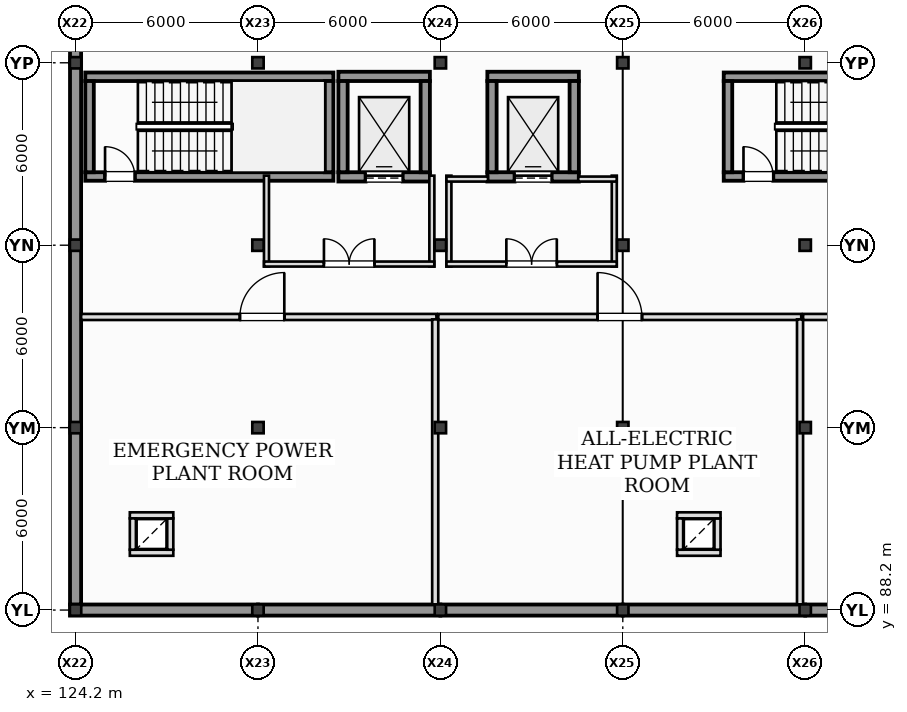
"""IFC4 building model, lengths in metres.
Left out: names, types, materials, properties, quantities, classifications, styles, units other than length and angle.
Written with IfcOpenShell. Run it as: python <this file> out.ifc"""

import sys

from ifc_helpers import new_model, si_unit, direction, frame, frame_2d, origin, origin_2d, place, context, subcontext, project, spatial, rectangle, i_section, extrude, element, fill, save


model = new_model("IFC4")
c1 = context("Model", 3, precision=1e-05, world=origin(), true_north=direction((0.0, 1.0)))
c2 = subcontext(c1, "Body", "Model", "MODEL_VIEW")
j1 = project(units=[si_unit("LENGTHUNIT", "METRE"), si_unit("PLANEANGLEUNIT", "RADIAN")], contexts=[c1])
p1 = place(None, origin())
s1 = spatial("IfcSite", under=j1, at=p1, CompositionType="ELEMENT")
p2 = place(p1, origin())
s2 = spatial("IfcBuilding", under=s1, at=p2, CompositionType="ELEMENT")
p3 = place(p2, frame((0.0, 0.0, -4.2)))
s3 = spatial("IfcBuildingStorey", under=s2, at=p3, CompositionType="ELEMENT", Elevation=-4.2)
for number, where, z_axis, x_axis in (
    (1, (124.2, 88.2, -0.45), (0.0, 0.0, 1.0), (1.0, 0.0, 0.0)),
    (2, (124.2, 94.2, -0.45), (0.0, 0.0, 1.0), (1.0, 0.0, 0.0)),
    (3, (124.2, 100.2, -0.45), (0.0, 0.0, 1.0), (1.0, 0.0, 0.0)),
    (4, (124.2, 106.2, -0.45), (0.0, 0.0, 1.0), (1.0, 0.0, 0.0)),
    (5, (130.2, 88.2, -0.45), (0.0, 0.0, 1.0), (1.0, 0.0, 0.0)),
    (6, (130.2, 94.2, -0.45), (0.0, 0.0, 1.0), (1.0, 0.0, 0.0)),
    (7, (130.2, 100.2, -0.45), (0.0, 0.0, 1.0), (1.0, 0.0, 0.0)),
    (8, (130.2, 106.2, -0.45), (0.0, 0.0, 1.0), (1.0, 0.0, 0.0)),
    (9, (136.2, 88.2, -0.45), (0.0, 0.0, 1.0), (1.0, 0.0, 0.0)),
    (10, (136.2, 94.2, -0.45), (0.0, 0.0, 1.0), (1.0, 0.0, 0.0)),
    (11, (136.2, 100.2, -0.45), (0.0, 0.0, 1.0), (1.0, 0.0, 0.0)),
    (12, (136.2, 106.2, -0.45), (0.0, 0.0, 1.0), (1.0, 0.0, 0.0)),
    (13, (142.2, 88.2, -0.45), (0.0, 0.0, 1.0), (1.0, 0.0, 0.0)),
    (14, (142.2, 94.2, -0.45), (0.0, 0.0, 1.0), (1.0, 0.0, 0.0)),
    (15, (142.2, 100.2, -0.45), (0.0, 0.0, 1.0), (1.0, 0.0, 0.0)),
    (16, (142.2, 106.2, -0.45), (0.0, 0.0, 1.0), (1.0, 0.0, 0.0)),
    (17, (148.2, 88.2, -0.45), (0.0, 0.0, 1.0), (1.0, 0.0, 0.0)),
    (18, (148.2, 94.2, -0.45), (0.0, 0.0, 1.0), (1.0, 0.0, 0.0)),
    (19, (148.2, 100.2, -0.45), (0.0, 0.0, 1.0), (1.0, 0.0, 0.0)),
    (20, (148.2, 106.2, -0.45), (0.0, 0.0, 1.0), (1.0, 0.0, 0.0)),
):
    element("IfcColumn", number, at=place(p3, frame(where, z_axis=z_axis, x_axis=x_axis)), inside=s3, PredefinedType="COLUMN", context=c2, shape_type="SweptSolid", body=[
        extrude(i_section(OverallWidth=0.374, OverallDepth=0.372, WebThickness=0.016, FlangeThickness=0.026, at=origin_2d()), origin(), (0.0, 0.0, 1.0), 4.65),
    ])
p4 = place(p3, frame((124.018, 88.2, 0.0), z_axis=(0.0, 0.0, 1.0), x_axis=(1.0, 0.0, 0.0)))
e21 = element("IfcWall", 21, at=p4, inside=s3, PredefinedType="SHEAR", context=c2, shape_type="SweptSolid", body=[
    extrude(rectangle(XDim=6.181, YDim=0.365, at=frame_2d((3.091, 0.0))), origin(), (0.0, 0.0, 1.0), 3.85),
])
for number, where, z_axis, x_axis in (
    (22, (130.201, 88.2, 0.0), (0.0, 0.0, 1.0), (1.0, 0.0, 0.0)),
    (23, (136.201, 88.2, 0.0), (0.0, 0.0, 1.0), (1.0, 0.0, 0.0)),
    (24, (142.201, 88.2, 0.0), (0.0, 0.0, 1.0), (1.0, 0.0, 0.0)),
    (25, (148.201, 88.2, 0.0), (0.0, 0.0, 1.0), (1.0, 0.0, 0.0)),
):
    element("IfcWall", number, at=place(p3, frame(where, z_axis=z_axis, x_axis=x_axis)), inside=s3, PredefinedType="SHEAR", context=c2, shape_type="SweptSolid", body=[
        extrude(rectangle(XDim=5.998, YDim=0.365, at=frame_2d((2.999, 0.0))), origin(), (0.0, 0.0, 1.0), 3.85),
    ])
p5 = place(p3, frame((124.2, 94.199, 0.0), z_axis=(0.0, 0.0, 1.0), x_axis=(0.0, -1.0, 0.0)))
e26 = element("IfcWall", 26, at=p5, inside=s3, PredefinedType="SHEAR", context=c2, shape_type="SweptSolid", body=[
    extrude(rectangle(XDim=5.814, YDim=0.365, at=frame_2d((2.907, 0.0))), origin(), (0.0, 0.0, 1.0), 3.85),
])
for number, where, z_axis, x_axis in (
    (27, (124.2, 100.199, 0.0), (0.0, 0.0, 1.0), (0.0, -1.0, 0.0)),
    (28, (124.2, 106.199, 0.0), (0.0, 0.0, 1.0), (0.0, -1.0, 0.0)),
):
    element("IfcWall", number, at=place(p3, frame(where, z_axis=z_axis, x_axis=x_axis)), inside=s3, PredefinedType="SHEAR", context=c2, shape_type="SweptSolid", body=[
        extrude(rectangle(XDim=5.998, YDim=0.365, at=frame_2d((2.999, 0.0))), origin(), (0.0, 0.0, 1.0), 3.85),
    ])
p6 = place(p3, frame((124.2, 112.015, 0.0), z_axis=(0.0, 0.0, 1.0), x_axis=(0.0, -1.0, 0.0)))
e29 = element("IfcWall", 29, at=p6, inside=s3, PredefinedType="SHEAR", context=c2, shape_type="SweptSolid", body=[
    extrude(rectangle(XDim=5.814, YDim=0.365, at=frame_2d((2.907, 0.0))), origin(), (0.0, 0.0, 1.0), 3.85),
])
p7 = place(p3, frame((124.52, 102.46, 0.0), z_axis=(0.0, 0.0, 1.0), x_axis=(1.0, 0.0, 0.0)))
e30 = element("IfcWall", 30, at=p7, inside=s3, PredefinedType="SHEAR", context=c2, shape_type="SweptSolid", body=[
    extrude(rectangle(XDim=8.16, YDim=0.28, at=frame_2d((4.08, 0.0))), origin(), (0.0, 0.0, 1.0), 4.2),
])
p8 = place(p7, frame((0.65, 0.0, 0.0)))
e31 = element("IfcOpeningElement", 31, at=p8, cuts=e30, PredefinedType="OPENING", context=c2, shape_type="SweptSolid", body=[
    extrude(rectangle(XDim=0.98, YDim=2.15, at=frame_2d((0.49, 1.075))), frame((0.0, 0.15, 0.0), z_axis=(0.0, -1.0, 0.0), x_axis=(1.0, 0.0, 0.0)), (0.0, 0.0, 1.0), 0.3),
])
p9 = place(p3, frame((132.68, 105.74, 0.0), z_axis=(0.0, 0.0, 1.0), x_axis=(-1.0, 0.0, 0.0)))
e32 = element("IfcWall", 32, at=p9, inside=s3, PredefinedType="SHEAR", context=c2, shape_type="SweptSolid", body=[
    extrude(rectangle(XDim=8.16, YDim=0.28, at=frame_2d((4.08, 0.0))), origin(), (0.0, 0.0, 1.0), 4.2),
])
for number, where, z_axis, x_axis in (
    (33, (124.66, 105.6, 0.0), (0.0, 0.0, 1.0), (0.0, -1.0, 0.0)),
    (34, (132.54, 102.6, 0.0), (0.0, 0.0, 1.0), (0.0, 1.0, 0.0)),
):
    element("IfcWall", number, at=place(p3, frame(where, z_axis=z_axis, x_axis=x_axis)), inside=s3, PredefinedType="SHEAR", context=c2, shape_type="SweptSolid", body=[
        extrude(rectangle(XDim=3.0, YDim=0.28, at=frame_2d((1.5, 0.0))), origin(), (0.0, 0.0, 1.0), 4.2),
    ])
p10 = place(p3, frame((145.52, 102.46, 0.0), z_axis=(0.0, 0.0, 1.0), x_axis=(1.0, 0.0, 0.0)))
e35 = element("IfcWall", 35, at=p10, inside=s3, PredefinedType="SHEAR", context=c2, shape_type="SweptSolid", body=[
    extrude(rectangle(XDim=8.16, YDim=0.28, at=frame_2d((4.08, 0.0))), origin(), (0.0, 0.0, 1.0), 4.2),
])
p11 = place(p10, frame((0.65, 0.0, 0.0)))
e36 = element("IfcOpeningElement", 36, at=p11, cuts=e35, PredefinedType="OPENING", context=c2, shape_type="SweptSolid", body=[
    extrude(rectangle(XDim=0.98, YDim=2.15, at=frame_2d((0.49, 1.075))), frame((0.0, 0.15, 0.0), z_axis=(0.0, -1.0, 0.0), x_axis=(1.0, 0.0, 0.0)), (0.0, 0.0, 1.0), 0.3),
])
p12 = place(p3, frame((153.68, 105.74, 0.0), z_axis=(0.0, 0.0, 1.0), x_axis=(-1.0, 0.0, 0.0)))
e37 = element("IfcWall", 37, at=p12, inside=s3, PredefinedType="SHEAR", context=c2, shape_type="SweptSolid", body=[
    extrude(rectangle(XDim=8.16, YDim=0.28, at=frame_2d((4.08, 0.0))), origin(), (0.0, 0.0, 1.0), 4.2),
])
p13 = place(p3, frame((145.66, 105.6, 0.0), z_axis=(0.0, 0.0, 1.0), x_axis=(0.0, -1.0, 0.0)))
e38 = element("IfcWall", 38, at=p13, inside=s3, PredefinedType="SHEAR", context=c2, shape_type="SweptSolid", body=[
    extrude(rectangle(XDim=3.0, YDim=0.28, at=frame_2d((1.5, 0.0))), origin(), (0.0, 0.0, 1.0), 4.2),
])
p14 = place(p3, frame((132.845, 102.448, 0.0), z_axis=(0.0, 0.0, 1.0), x_axis=(1.0, 0.0, 0.0)))
e39 = element("IfcWall", 39, at=p14, inside=s3, PredefinedType="SHEAR", context=c2, shape_type="SweptSolid", body=[
    extrude(rectangle(XDim=3.01, YDim=0.305, at=frame_2d((1.505, 0.0))), origin(), (0.0, 0.0, 1.0), 4.2),
])
p15 = place(p14, frame((0.895, 0.0, 0.0)))
e40 = element("IfcOpeningElement", 40, at=p15, cuts=e39, PredefinedType="OPENING", context=c2, shape_type="SweptSolid", body=[
    extrude(rectangle(XDim=1.22, YDim=2.22, at=frame_2d((0.61, 1.11))), frame((0.0, 0.162, 0.0), z_axis=(0.0, -1.0, 0.0), x_axis=(1.0, 0.0, 0.0)), (0.0, 0.0, 1.0), 0.325),
])
p16 = place(p3, frame((135.855, 105.752, 0.0), z_axis=(0.0, 0.0, 1.0), x_axis=(-1.0, 0.0, 0.0)))
e41 = element("IfcWall", 41, at=p16, inside=s3, PredefinedType="SHEAR", context=c2, shape_type="SweptSolid", body=[
    extrude(rectangle(XDim=3.01, YDim=0.305, at=frame_2d((1.505, 0.0))), origin(), (0.0, 0.0, 1.0), 4.2),
])
for number, where, z_axis, x_axis in (
    (42, (132.998, 105.6, 0.0), (0.0, 0.0, 1.0), (0.0, -1.0, 0.0)),
    (43, (135.702, 102.6, 0.0), (0.0, 0.0, 1.0), (0.0, 1.0, 0.0)),
):
    element("IfcWall", number, at=place(p3, frame(where, z_axis=z_axis, x_axis=x_axis)), inside=s3, PredefinedType="SHEAR", context=c2, shape_type="SweptSolid", body=[
        extrude(rectangle(XDim=3.0, YDim=0.305, at=frame_2d((1.5, 0.0))), origin(), (0.0, 0.0, 1.0), 4.2),
    ])
for number, where, z_axis, x_axis in (
    (44, (130.48, 99.5, 0.0), (0.0, 0.0, 1.0), (0.0, 1.0, 0.0)),
    (45, (135.92, 102.488, 0.0), (0.0, 0.0, 1.0), (0.0, -1.0, 0.0)),
):
    element("IfcWall", number, at=place(p3, frame(where, z_axis=z_axis, x_axis=x_axis)), inside=s3, PredefinedType="PARTITIONING", context=c2, shape_type="SweptSolid", body=[
        extrude(rectangle(XDim=2.988, YDim=0.165, at=frame_2d((1.494, 0.0))), origin(), (0.0, 0.0, 1.0), 3.79),
    ])
p17 = place(p3, frame((130.4, 99.58, 0.0), z_axis=(0.0, 0.0, 1.0), x_axis=(1.0, 0.0, 0.0)))
e46 = element("IfcWall", 46, at=p17, inside=s3, PredefinedType="PARTITIONING", context=c2, shape_type="SweptSolid", body=[
    extrude(rectangle(XDim=5.6, YDim=0.165, at=frame_2d((2.8, 0.0))), origin(), (0.0, 0.0, 1.0), 3.79),
])
p18 = place(p17, frame((1.97, 0.0, 0.0)))
e47 = element("IfcOpeningElement", 47, at=p18, cuts=e46, PredefinedType="OPENING", context=c2, shape_type="SweptSolid", body=[
    extrude(rectangle(XDim=1.66, YDim=2.2, at=frame_2d((0.83, 1.1))), frame((0.0, 0.093, 0.0), z_axis=(0.0, -1.0, 0.0), x_axis=(1.0, 0.0, 0.0)), (0.0, 0.0, 1.0), 0.185),
])
p19 = place(p3, frame((137.745, 102.448, 0.0), z_axis=(0.0, 0.0, 1.0), x_axis=(1.0, 0.0, 0.0)))
e48 = element("IfcWall", 48, at=p19, inside=s3, PredefinedType="SHEAR", context=c2, shape_type="SweptSolid", body=[
    extrude(rectangle(XDim=3.01, YDim=0.305, at=frame_2d((1.505, 0.0))), origin(), (0.0, 0.0, 1.0), 4.2),
])
p20 = place(p19, frame((0.895, 0.0, 0.0)))
e49 = element("IfcOpeningElement", 49, at=p20, cuts=e48, PredefinedType="OPENING", context=c2, shape_type="SweptSolid", body=[
    extrude(rectangle(XDim=1.22, YDim=2.22, at=frame_2d((0.61, 1.11))), frame((0.0, 0.162, 0.0), z_axis=(0.0, -1.0, 0.0), x_axis=(1.0, 0.0, 0.0)), (0.0, 0.0, 1.0), 0.325),
])
p21 = place(p3, frame((140.755, 105.752, 0.0), z_axis=(0.0, 0.0, 1.0), x_axis=(-1.0, 0.0, 0.0)))
e50 = element("IfcWall", 50, at=p21, inside=s3, PredefinedType="SHEAR", context=c2, shape_type="SweptSolid", body=[
    extrude(rectangle(XDim=3.01, YDim=0.305, at=frame_2d((1.505, 0.0))), origin(), (0.0, 0.0, 1.0), 4.2),
])
for number, where, z_axis, x_axis in (
    (51, (137.897, 105.6, 0.0), (0.0, 0.0, 1.0), (0.0, -1.0, 0.0)),
    (52, (140.603, 102.6, 0.0), (0.0, 0.0, 1.0), (0.0, 1.0, 0.0)),
):
    element("IfcWall", number, at=place(p3, frame(where, z_axis=z_axis, x_axis=x_axis)), inside=s3, PredefinedType="SHEAR", context=c2, shape_type="SweptSolid", body=[
        extrude(rectangle(XDim=3.0, YDim=0.305, at=frame_2d((1.5, 0.0))), origin(), (0.0, 0.0, 1.0), 4.2),
    ])
for number, where, z_axis, x_axis in (
    (53, (136.48, 99.5, 0.0), (0.0, 0.0, 1.0), (0.0, 1.0, 0.0)),
    (54, (141.92, 102.488, 0.0), (0.0, 0.0, 1.0), (0.0, -1.0, 0.0)),
):
    element("IfcWall", number, at=place(p3, frame(where, z_axis=z_axis, x_axis=x_axis)), inside=s3, PredefinedType="PARTITIONING", context=c2, shape_type="SweptSolid", body=[
        extrude(rectangle(XDim=2.988, YDim=0.165, at=frame_2d((1.494, 0.0))), origin(), (0.0, 0.0, 1.0), 3.79),
    ])
p22 = place(p3, frame((136.4, 102.375, 0.0), z_axis=(0.0, 0.0, 1.0), x_axis=(1.0, 0.0, 0.0)))
e55 = element("IfcWall", 55, at=p22, inside=s3, PredefinedType="PARTITIONING", context=c2, shape_type="SweptSolid", body=[
    extrude(rectangle(XDim=1.365, YDim=0.165, at=frame_2d((0.683, 0.0))), origin(), (0.0, 0.0, 1.0), 3.79),
])
p23 = place(p3, frame((140.735, 102.375, 0.0), z_axis=(0.0, 0.0, 1.0), x_axis=(1.0, 0.0, 0.0)))
e56 = element("IfcWall", 56, at=p23, inside=s3, PredefinedType="PARTITIONING", context=c2, shape_type="SweptSolid", body=[
    extrude(rectangle(XDim=1.265, YDim=0.165, at=frame_2d((0.632, 0.0))), origin(), (0.0, 0.0, 1.0), 3.79),
])
p24 = place(p3, frame((136.4, 99.58, 0.0), z_axis=(0.0, 0.0, 1.0), x_axis=(1.0, 0.0, 0.0)))
e57 = element("IfcWall", 57, at=p24, inside=s3, PredefinedType="PARTITIONING", context=c2, shape_type="SweptSolid", body=[
    extrude(rectangle(XDim=5.6, YDim=0.165, at=frame_2d((2.8, 0.0))), origin(), (0.0, 0.0, 1.0), 3.79),
])
p25 = place(p24, frame((1.97, 0.0, 0.0)))
e58 = element("IfcOpeningElement", 58, at=p25, cuts=e57, PredefinedType="OPENING", context=c2, shape_type="SweptSolid", body=[
    extrude(rectangle(XDim=1.66, YDim=2.2, at=frame_2d((0.83, 1.1))), frame((0.0, 0.093, 0.0), z_axis=(0.0, -1.0, 0.0), x_axis=(1.0, 0.0, 0.0)), (0.0, 0.0, 1.0), 0.185),
])
p26 = place(p3, frame((125.985, 90.085, 0.0), z_axis=(0.0, 0.0, 1.0), x_axis=(1.0, 0.0, 0.0)))
e59 = element("IfcWall", 59, at=p26, inside=s3, PredefinedType="PARTITIONING", context=c2, shape_type="SweptSolid", body=[
    extrude(rectangle(XDim=1.43, YDim=0.2, at=frame_2d((0.715, 0.0))), origin(), (0.0, 0.0, 1.0), 3.79),
])
p27 = place(p3, frame((127.315, 90.185, 0.0), z_axis=(0.0, 0.0, 1.0), x_axis=(0.0, 1.0, 0.0)))
e60 = element("IfcWall", 60, at=p27, inside=s3, PredefinedType="PARTITIONING", context=c2, shape_type="SweptSolid", body=[
    extrude(rectangle(XDim=1.03, YDim=0.2, at=frame_2d((0.515, 0.0))), origin(), (0.0, 0.0, 1.0), 3.79),
])
p28 = place(p3, frame((127.415, 91.315, 0.0), z_axis=(0.0, 0.0, 1.0), x_axis=(-1.0, 0.0, 0.0)))
e61 = element("IfcWall", 61, at=p28, inside=s3, PredefinedType="PARTITIONING", context=c2, shape_type="SweptSolid", body=[
    extrude(rectangle(XDim=1.43, YDim=0.2, at=frame_2d((0.715, 0.0))), origin(), (0.0, 0.0, 1.0), 3.79),
])
p29 = place(p3, frame((126.085, 91.215, 0.0), z_axis=(0.0, 0.0, 1.0), x_axis=(0.0, -1.0, 0.0)))
e62 = element("IfcWall", 62, at=p29, inside=s3, PredefinedType="PARTITIONING", context=c2, shape_type="SweptSolid", body=[
    extrude(rectangle(XDim=1.03, YDim=0.2, at=frame_2d((0.515, 0.0))), origin(), (0.0, 0.0, 1.0), 3.79),
])
p30 = place(p3, frame((143.985, 90.085, 0.0), z_axis=(0.0, 0.0, 1.0), x_axis=(1.0, 0.0, 0.0)))
e63 = element("IfcWall", 63, at=p30, inside=s3, PredefinedType="PARTITIONING", context=c2, shape_type="SweptSolid", body=[
    extrude(rectangle(XDim=1.43, YDim=0.2, at=frame_2d((0.715, 0.0))), origin(), (0.0, 0.0, 1.0), 3.79),
])
p31 = place(p3, frame((145.315, 90.185, 0.0), z_axis=(0.0, 0.0, 1.0), x_axis=(0.0, 1.0, 0.0)))
e64 = element("IfcWall", 64, at=p31, inside=s3, PredefinedType="PARTITIONING", context=c2, shape_type="SweptSolid", body=[
    extrude(rectangle(XDim=1.03, YDim=0.2, at=frame_2d((0.515, 0.0))), origin(), (0.0, 0.0, 1.0), 3.79),
])
p32 = place(p3, frame((145.415, 91.315, 0.0), z_axis=(0.0, 0.0, 1.0), x_axis=(-1.0, 0.0, 0.0)))
e65 = element("IfcWall", 65, at=p32, inside=s3, PredefinedType="PARTITIONING", context=c2, shape_type="SweptSolid", body=[
    extrude(rectangle(XDim=1.43, YDim=0.2, at=frame_2d((0.715, 0.0))), origin(), (0.0, 0.0, 1.0), 3.79),
])
p33 = place(p3, frame((144.085, 91.215, 0.0), z_axis=(0.0, 0.0, 1.0), x_axis=(0.0, -1.0, 0.0)))
e66 = element("IfcWall", 66, at=p33, inside=s3, PredefinedType="PARTITIONING", context=c2, shape_type="SweptSolid", body=[
    extrude(rectangle(XDim=1.03, YDim=0.2, at=frame_2d((0.515, 0.0))), origin(), (0.0, 0.0, 1.0), 3.79),
])
p34 = place(p3, frame((124.383, 97.84, 0.0), z_axis=(0.0, 0.0, 1.0), x_axis=(1.0, 0.0, 0.0)))
e67 = element("IfcWall", 67, at=p34, inside=s3, PredefinedType="PARTITIONING", context=c2, shape_type="SweptSolid", body=[
    extrude(rectangle(XDim=11.688, YDim=0.2, at=frame_2d((5.844, 0.0))), origin(), (0.0, 0.0, 1.0), 3.79),
])
p35 = place(p34, frame((5.224, 0.0, 0.0)))
e68 = element("IfcOpeningElement", 68, at=p35, cuts=e67, PredefinedType="OPENING", context=c2, shape_type="SweptSolid", body=[
    extrude(rectangle(XDim=1.46, YDim=2.3, at=frame_2d((0.73, 1.15))), frame((0.0, 0.11, 0.0), z_axis=(0.0, -1.0, 0.0), x_axis=(1.0, 0.0, 0.0)), (0.0, 0.0, 1.0), 0.22),
])
p36 = place(p3, frame((136.03, 97.76, 0.0), z_axis=(0.0, 0.0, 1.0), x_axis=(0.0, -1.0, 0.0)))
e69 = element("IfcWall", 69, at=p36, inside=s3, PredefinedType="PARTITIONING", context=c2, shape_type="SweptSolid", body=[
    extrude(rectangle(XDim=9.377, YDim=0.2, at=frame_2d((4.689, 0.0))), origin(), (0.0, 0.0, 1.0), 3.79),
])
p37 = place(p3, frame((136.13, 97.84, 0.0), z_axis=(0.0, 0.0, 1.0), x_axis=(1.0, 0.0, 0.0)))
e70 = element("IfcWall", 70, at=p37, inside=s3, PredefinedType="PARTITIONING", context=c2, shape_type="SweptSolid", body=[
    extrude(rectangle(XDim=11.94, YDim=0.2, at=frame_2d((5.97, 0.0))), origin(), (0.0, 0.0, 1.0), 3.79),
])
p38 = place(p37, frame((5.24, 0.0, 0.0)))
e71 = element("IfcOpeningElement", 71, at=p38, cuts=e70, PredefinedType="OPENING", context=c2, shape_type="SweptSolid", body=[
    extrude(rectangle(XDim=1.46, YDim=2.3, at=frame_2d((0.73, 1.15))), frame((0.0, 0.11, 0.0), z_axis=(0.0, -1.0, 0.0), x_axis=(1.0, 0.0, 0.0)), (0.0, 0.0, 1.0), 0.22),
])
p39 = place(p3, frame((148.03, 97.76, 0.0), z_axis=(0.0, 0.0, 1.0), x_axis=(0.0, -1.0, 0.0)))
e72 = element("IfcWall", 72, at=p39, inside=s3, PredefinedType="PARTITIONING", context=c2, shape_type="SweptSolid", body=[
    extrude(rectangle(XDim=9.377, YDim=0.2, at=frame_2d((4.689, 0.0))), origin(), (0.0, 0.0, 1.0), 3.79),
])
p40 = place(p3, frame((148.13, 97.84, 0.0), z_axis=(0.0, 0.0, 1.0), x_axis=(1.0, 0.0, 0.0)))
e73 = element("IfcWall", 73, at=p40, inside=s3, PredefinedType="PARTITIONING", context=c2, shape_type="SweptSolid", body=[
    extrude(rectangle(XDim=8.99, YDim=0.2, at=frame_2d((4.495, 0.0))), origin(), (0.0, 0.0, 1.0), 3.79),
])
p41 = place(p40, frame((3.765, 0.0, 0.0)))
e74 = element("IfcOpeningElement", 74, at=p41, cuts=e73, PredefinedType="OPENING", context=c2, shape_type="SweptSolid", body=[
    extrude(rectangle(XDim=1.46, YDim=2.3, at=frame_2d((0.73, 1.15))), frame((0.0, 0.11, 0.0), z_axis=(0.0, -1.0, 0.0), x_axis=(1.0, 0.0, 0.0)), (0.0, 0.0, 1.0), 0.22),
])
p42 = place(p8, origin())
e75 = element("IfcDoor", 75, at=p42, inside=s3, OperationType="SINGLE_SWING_LEFT", PredefinedType="DOOR", context=c2, shape_type="SweptSolid", body=[
    extrude(rectangle(XDim=0.98, YDim=2.15, at=frame_2d((0.49, 1.075))), frame((0.0, 0.025, 0.0), z_axis=(0.0, -1.0, 0.0), x_axis=(1.0, 0.0, 0.0)), (0.0, 0.0, 1.0), 0.05),
])
fill(e31, e75)
p43 = place(p11, origin())
e76 = element("IfcDoor", 76, at=p43, inside=s3, OperationType="SINGLE_SWING_LEFT", PredefinedType="DOOR", context=c2, shape_type="SweptSolid", body=[
    extrude(rectangle(XDim=0.98, YDim=2.15, at=frame_2d((0.49, 1.075))), frame((0.0, 0.025, 0.0), z_axis=(0.0, -1.0, 0.0), x_axis=(1.0, 0.0, 0.0)), (0.0, 0.0, 1.0), 0.05),
])
fill(e36, e76)
p44 = place(p15, origin())
e77 = element("IfcDoor", 77, at=p44, inside=s3, OperationType="SLIDING_TO_LEFT", PredefinedType="DOOR", context=c2, shape_type="SweptSolid", body=[
    extrude(rectangle(XDim=1.22, YDim=2.22, at=frame_2d((0.61, 1.11))), frame((0.0, 0.025, 0.0), z_axis=(0.0, -1.0, 0.0), x_axis=(1.0, 0.0, 0.0)), (0.0, 0.0, 1.0), 0.05),
])
fill(e40, e77)
p45 = place(p18, frame((1.66, 0.0, 0.0), z_axis=(0.0, 0.0, 1.0), x_axis=(-1.0, 0.0, 0.0)))
e78 = element("IfcDoor", 78, at=p45, inside=s3, OperationType="DOUBLE_DOOR_SINGLE_SWING", PredefinedType="DOOR", context=c2, shape_type="SweptSolid", body=[
    extrude(rectangle(XDim=1.66, YDim=2.2, at=frame_2d((0.83, 1.1))), frame((0.0, 0.025, 0.0), z_axis=(0.0, -1.0, 0.0), x_axis=(1.0, 0.0, 0.0)), (0.0, 0.0, 1.0), 0.05),
])
fill(e47, e78)
p46 = place(p20, origin())
e79 = element("IfcDoor", 79, at=p46, inside=s3, OperationType="SLIDING_TO_LEFT", PredefinedType="DOOR", context=c2, shape_type="SweptSolid", body=[
    extrude(rectangle(XDim=1.22, YDim=2.22, at=frame_2d((0.61, 1.11))), frame((0.0, 0.025, 0.0), z_axis=(0.0, -1.0, 0.0), x_axis=(1.0, 0.0, 0.0)), (0.0, 0.0, 1.0), 0.05),
])
fill(e49, e79)
p47 = place(p25, frame((1.66, 0.0, 0.0), z_axis=(0.0, 0.0, 1.0), x_axis=(-1.0, 0.0, 0.0)))
e80 = element("IfcDoor", 80, at=p47, inside=s3, OperationType="DOUBLE_DOOR_SINGLE_SWING", PredefinedType="DOOR", context=c2, shape_type="SweptSolid", body=[
    extrude(rectangle(XDim=1.66, YDim=2.2, at=frame_2d((0.83, 1.1))), frame((0.0, 0.025, 0.0), z_axis=(0.0, -1.0, 0.0), x_axis=(1.0, 0.0, 0.0)), (0.0, 0.0, 1.0), 0.05),
])
fill(e58, e80)
p48 = place(p35, frame((1.46, 0.0, 0.0), z_axis=(0.0, 0.0, 1.0), x_axis=(-1.0, 0.0, 0.0)))
e81 = element("IfcDoor", 81, at=p48, inside=s3, OperationType="SINGLE_SWING_RIGHT", PredefinedType="DOOR", context=c2, shape_type="SweptSolid", body=[
    extrude(rectangle(XDim=1.46, YDim=2.3, at=frame_2d((0.73, 1.15))), frame((0.0, 0.025, 0.0), z_axis=(0.0, -1.0, 0.0), x_axis=(1.0, 0.0, 0.0)), (0.0, 0.0, 1.0), 0.05),
])
fill(e68, e81)
p49 = place(p38, frame((1.46, 0.0, 0.0), z_axis=(0.0, 0.0, 1.0), x_axis=(-1.0, 0.0, 0.0)))
e82 = element("IfcDoor", 82, at=p49, inside=s3, OperationType="SINGLE_SWING_LEFT", PredefinedType="DOOR", context=c2, shape_type="SweptSolid", body=[
    extrude(rectangle(XDim=1.46, YDim=2.3, at=frame_2d((0.73, 1.15))), frame((0.0, 0.025, 0.0), z_axis=(0.0, -1.0, 0.0), x_axis=(1.0, 0.0, 0.0)), (0.0, 0.0, 1.0), 0.05),
])
fill(e71, e82)
save(model, sys.argv[1])
